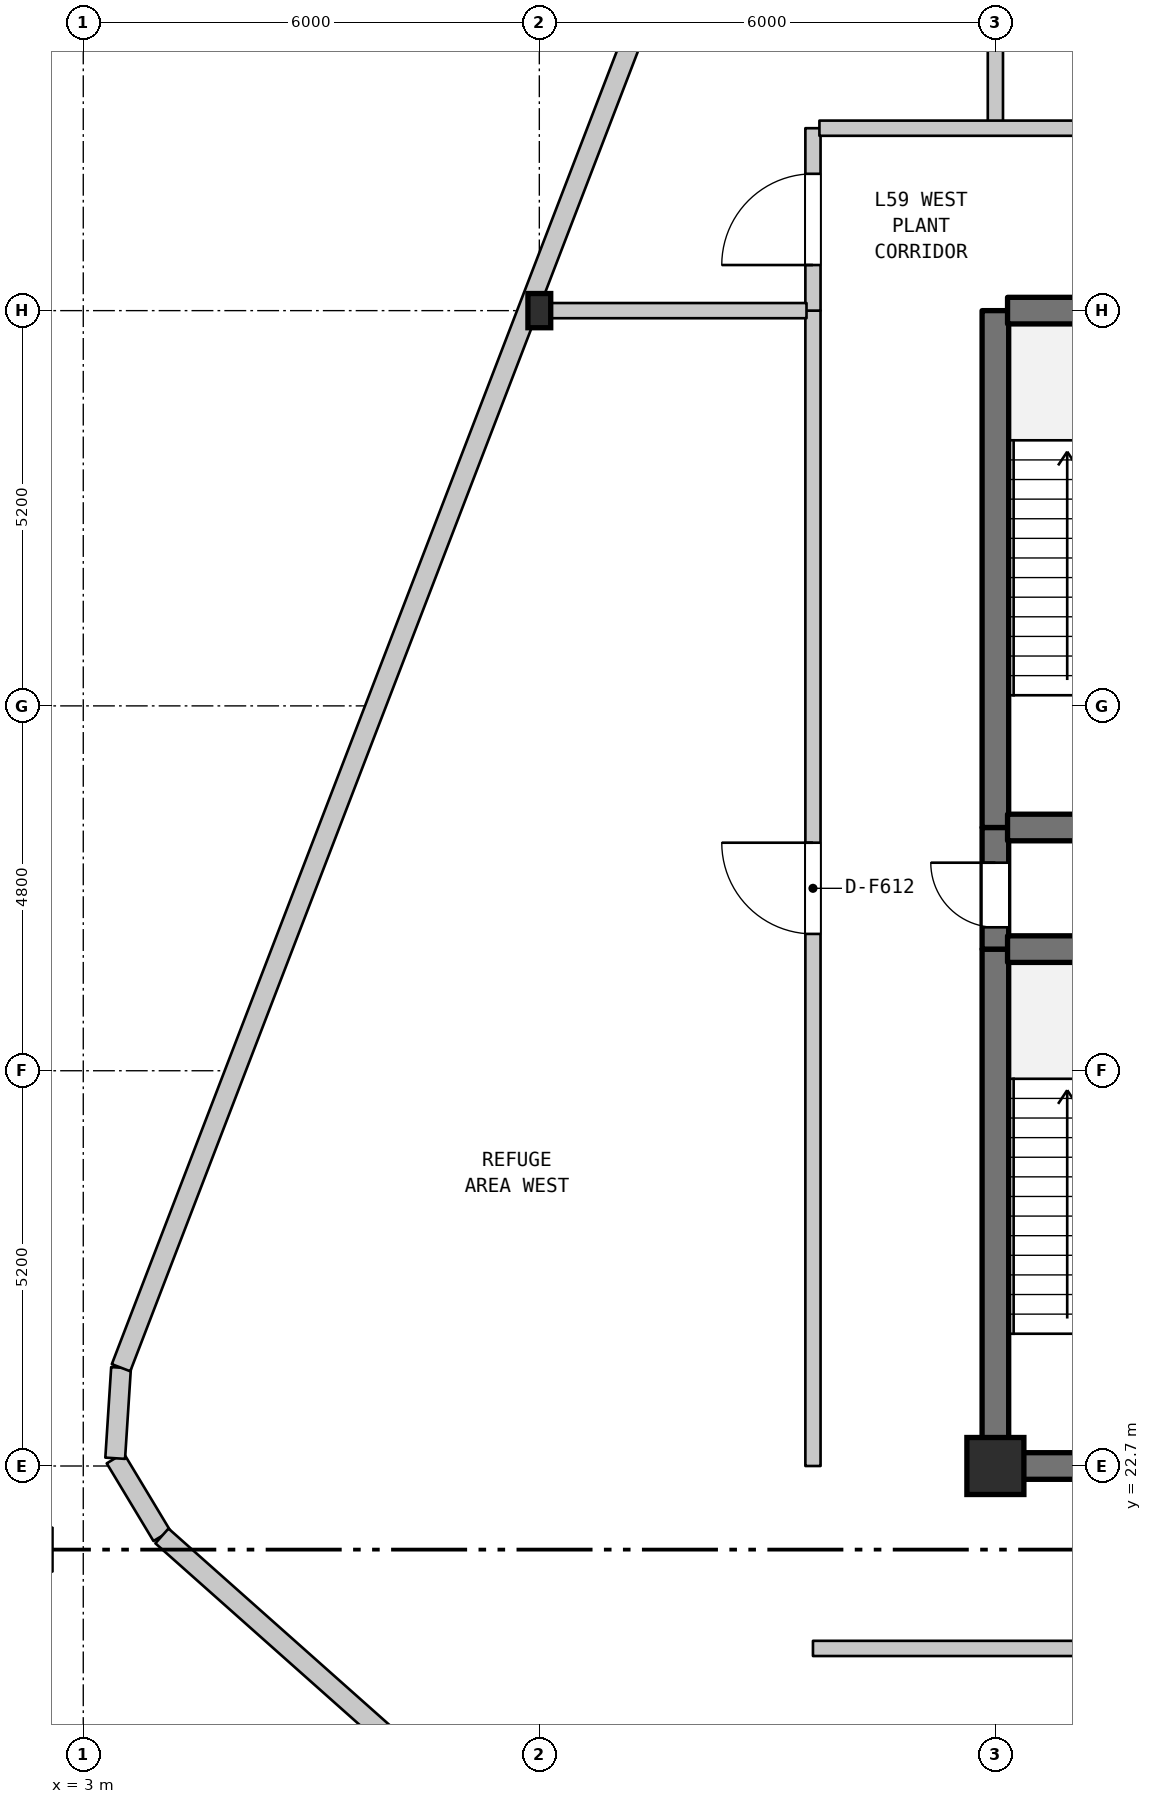
"""IFC4 building model, lengths in metres.
Left out: names, types, materials, properties, quantities, classifications, styles, units other than length and angle.
Written with IfcOpenShell. Run it as: python <this file> out.ifc"""

import sys

from ifc_helpers import new_model, si_unit, direction, frame, frame_2d, origin, origin_2d, place, context, subcontext, project, spatial, rectangle, i_section, extrude, element, fill, save


model = new_model("IFC4")
c1 = context("Model", 3, precision=1e-05, world=origin(), true_north=direction((0.0, 1.0)))
c2 = subcontext(c1, "Body", "Model", "MODEL_VIEW")
j1 = project(units=[si_unit("LENGTHUNIT", "METRE"), si_unit("PLANEANGLEUNIT", "RADIAN")], contexts=[c1])
p1 = place(None, origin())
s1 = spatial("IfcSite", under=j1, at=p1, CompositionType="ELEMENT")
p2 = place(p1, origin())
s2 = spatial("IfcBuilding", under=s1, at=p2, CompositionType="ELEMENT")
p3 = place(p2, frame((0.0, 0.0, 237.6)))
s3 = spatial("IfcBuildingStorey", under=s2, at=p3, CompositionType="ELEMENT", Elevation=237.6)
p4 = place(p3, frame((9.0, 37.9, 0.0), z_axis=(0.0, 0.0, 1.0), x_axis=(1.0, 0.0, 0.0)))
e1 = element("IfcColumn", 1, at=p4, inside=s3, PredefinedType="COLUMN", context=c2, shape_type="SweptSolid", body=[
    extrude(i_section(OverallWidth=0.3, OverallDepth=0.45, WebThickness=0.014, FlangeThickness=0.026, FilletRadius=0.027, at=origin_2d()), origin(), (0.0, 0.0, 1.0), 5.2),
])
p5 = place(p3, frame((15.0, 22.7, 0.0), z_axis=(0.0, 0.0, 1.0), x_axis=(1.0, 0.0, 0.0)))
e2 = element("IfcColumn", 2, at=p5, inside=s3, PredefinedType="COLUMN", context=c2, shape_type="SweptSolid", body=[
    extrude(rectangle(XDim=0.75, YDim=0.75, at=origin_2d()), origin(), (0.0, 0.0, 1.0), 5.2),
])
p6 = place(p3, frame((4.035, 21.78, 0.0), z_axis=(0.0, 0.0, 1.0), x_axis=(-0.51560906497, 0.856823956318, 0.0)))
e3 = element("IfcWall", 3, at=p6, inside=s3, PredefinedType="STANDARD", context=c2, shape_type="SweptSolid", body=[
    extrude(rectangle(XDim=1.193, YDim=0.26, at=frame_2d((0.596, 0.0))), origin(), (0.0, 0.0, 1.0), 4.88),
])
p7 = place(p3, frame((3.42, 22.802, 0.0), z_axis=(0.0, 0.0, 1.0), x_axis=(0.064645147091, 0.997908314906, 0.0)))
e4 = element("IfcWall", 4, at=p7, inside=s3, PredefinedType="STANDARD", context=c2, shape_type="SweptSolid", body=[
    extrude(rectangle(XDim=1.193, YDim=0.26, at=frame_2d((0.597, 0.0))), origin(), (0.0, 0.0, 1.0), 4.88),
])
p8 = place(p3, frame((3.497, 23.993, 0.0), z_axis=(0.0, 0.0, 1.0), x_axis=(0.358990281293, 0.93334129767, 0.0)))
e5 = element("IfcWall", 5, at=p8, inside=s3, PredefinedType="STANDARD", context=c2, shape_type="SweptSolid", body=[
    extrude(rectangle(XDim=30.669, YDim=0.26, at=frame_2d((15.335, 0.0))), origin(), (0.0, 0.0, 1.0), 4.88),
])
p9 = place(p3, frame((12.6, 22.7, 0.0), z_axis=(0.0, 0.0, 1.0), x_axis=(0.0, 1.0, 0.0)))
e6 = element("IfcWall", 6, at=p9, inside=s3, PredefinedType="STANDARD", context=c2, shape_type="SweptSolid", body=[
    extrude(rectangle(XDim=15.2, YDim=0.2, at=frame_2d((7.6, 0.0))), origin(), (0.0, 0.0, 1.0), 4.88),
])
p10 = place(p9, frame((7.0, 0.0, 0.0)))
e7 = element("IfcOpeningElement", 7, at=p10, cuts=e6, PredefinedType="OPENING", context=c2, shape_type="SweptSolid", body=[
    extrude(rectangle(XDim=1.2, YDim=2.2, at=frame_2d((0.6, 1.1))), frame((0.0, 0.11, 0.0), z_axis=(0.0, -1.0, 0.0), x_axis=(1.0, 0.0, 0.0)), (0.0, 0.0, 1.0), 0.22),
])
p11 = place(p3, frame((12.6, 37.9, 0.0), z_axis=(0.0, 0.0, 1.0), x_axis=(0.0, 1.0, 0.0)))
e8 = element("IfcWall", 8, at=p11, inside=s3, PredefinedType="STANDARD", context=c2, shape_type="SweptSolid", body=[
    extrude(rectangle(XDim=2.4, YDim=0.2, at=frame_2d((1.2, 0.0))), origin(), (0.0, 0.0, 1.0), 4.88),
])
p12 = place(p11, frame((0.6, 0.0, 0.0)))
e9 = element("IfcOpeningElement", 9, at=p12, cuts=e8, PredefinedType="OPENING", context=c2, shape_type="SweptSolid", body=[
    extrude(rectangle(XDim=1.2, YDim=2.2, at=frame_2d((0.6, 1.1))), frame((0.0, 0.11, 0.0), z_axis=(0.0, -1.0, 0.0), x_axis=(1.0, 0.0, 0.0)), (0.0, 0.0, 1.0), 0.22),
])
p13 = place(p3, frame((15.0, 22.7, 0.0), z_axis=(0.0, 0.0, 1.0), x_axis=(0.0, 1.0, 0.0)))
e10 = element("IfcWall", 10, at=p13, inside=s3, PredefinedType="SHEAR", context=c2, shape_type="SweptSolid", body=[
    extrude(rectangle(XDim=6.8, YDim=0.35, at=frame_2d((3.4, 0.0))), origin(), (0.0, 0.0, 1.0), 4.88),
])
p14 = place(p3, frame((15.0, 29.5, 0.0), z_axis=(0.0, 0.0, 1.0), x_axis=(0.0, 1.0, 0.0)))
e11 = element("IfcWall", 11, at=p14, inside=s3, PredefinedType="SHEAR", context=c2, shape_type="SweptSolid", body=[
    extrude(rectangle(XDim=1.6, YDim=0.35, at=frame_2d((0.8, 0.0))), origin(), (0.0, 0.0, 1.0), 4.88),
])
p15 = place(p14, frame((0.287, 0.0, 0.0)))
e12 = element("IfcOpeningElement", 12, at=p15, cuts=e11, PredefinedType="OPENING", context=c2, shape_type="SweptSolid", body=[
    extrude(rectangle(XDim=0.85, YDim=2.1, at=frame_2d((0.425, 1.05))), frame((0.0, 0.185, 0.0), z_axis=(0.0, -1.0, 0.0), x_axis=(1.0, 0.0, 0.0)), (0.0, 0.0, 1.0), 0.37),
])
p16 = place(p3, frame((15.0, 31.1, 0.0), z_axis=(0.0, 0.0, 1.0), x_axis=(0.0, 1.0, 0.0)))
e13 = element("IfcWall", 13, at=p16, inside=s3, PredefinedType="SHEAR", context=c2, shape_type="SweptSolid", body=[
    extrude(rectangle(XDim=6.8, YDim=0.35, at=frame_2d((3.4, 0.0))), origin(), (0.0, 0.0, 1.0), 4.88),
])
p17 = place(p3, frame((15.0, 40.3, 0.0), z_axis=(0.0, 0.0, 1.0), x_axis=(0.0, 1.0, 0.0)))
e14 = element("IfcWall", 14, at=p17, inside=s3, PredefinedType="STANDARD", context=c2, shape_type="SweptSolid", body=[
    extrude(rectangle(XDim=12.933, YDim=0.2, at=frame_2d((6.466, 0.0))), origin(), (0.0, 0.0, 1.0), 4.88),
])
p18 = place(p3, frame((12.6, 20.3, 0.0), z_axis=(0.0, 0.0, 1.0), x_axis=(1.0, 0.0, 0.0)))
e15 = element("IfcWall", 15, at=p18, inside=s3, PredefinedType="STANDARD", context=c2, shape_type="SweptSolid", body=[
    extrude(rectangle(XDim=20.315, YDim=0.2, at=frame_2d((10.157, 0.0))), origin(), (0.0, 0.0, 1.0), 4.88),
])
p19 = place(p18, frame((6.8, 0.0, 0.0)))
e16 = element("IfcOpeningElement", 16, at=p19, cuts=e15, PredefinedType="OPENING", context=c2, shape_type="SweptSolid", body=[
    extrude(rectangle(XDim=1.2, YDim=2.2, at=frame_2d((0.6, 1.1))), frame((0.0, 0.11, 0.0), z_axis=(0.0, -1.0, 0.0), x_axis=(1.0, 0.0, 0.0)), (0.0, 0.0, 1.0), 0.22),
])
p20 = place(p18, frame((16.225, 0.0, 0.0)))
e17 = element("IfcOpeningElement", 17, at=p20, cuts=e15, PredefinedType="OPENING", context=c2, shape_type="SweptSolid", body=[
    extrude(rectangle(XDim=1.2, YDim=2.2, at=frame_2d((0.6, 1.1))), frame((0.0, 0.11, 0.0), z_axis=(0.0, -1.0, 0.0), x_axis=(1.0, 0.0, 0.0)), (0.0, 0.0, 1.0), 0.22),
])
for number, where, z_axis, x_axis in (
    (18, (15.16, 22.7, 0.0), (0.0, 0.0, 1.0), (1.0, 0.0, 0.0)),
    (19, (15.16, 29.5, 0.0), (0.0, 0.0, 1.0), (1.0, 0.0, 0.0)),
    (20, (15.16, 31.1, 0.0), (0.0, 0.0, 1.0), (1.0, 0.0, 0.0)),
):
    element("IfcWall", number, at=place(p3, frame(where, z_axis=z_axis, x_axis=x_axis)), inside=s3, PredefinedType="SHEAR", context=c2, shape_type="SweptSolid", body=[
        extrude(rectangle(XDim=3.68, YDim=0.35, at=frame_2d((1.84, 0.0))), origin(), (0.0, 0.0, 1.0), 4.88),
    ])
p21 = place(p3, frame((8.856, 37.9, 0.0), z_axis=(0.0, 0.0, 1.0), x_axis=(1.0, 0.0, 0.0)))
e21 = element("IfcWall", 21, at=p21, inside=s3, PredefinedType="STANDARD", context=c2, shape_type="SweptSolid", body=[
    extrude(rectangle(XDim=3.659, YDim=0.2, at=frame_2d((1.83, 0.0))), origin(), (0.0, 0.0, 1.0), 4.88),
])
p22 = place(p3, frame((15.16, 37.9, 0.0), z_axis=(0.0, 0.0, 1.0), x_axis=(1.0, 0.0, 0.0)))
e22 = element("IfcWall", 22, at=p22, inside=s3, PredefinedType="SHEAR", context=c2, shape_type="SweptSolid", body=[
    extrude(rectangle(XDim=3.68, YDim=0.35, at=frame_2d((1.84, 0.0))), origin(), (0.0, 0.0, 1.0), 4.88),
])
p23 = place(p3, frame((12.685, 40.3, 0.0), z_axis=(0.0, 0.0, 1.0), x_axis=(1.0, 0.0, 0.0)))
e23 = element("IfcWall", 23, at=p23, inside=s3, PredefinedType="STANDARD", context=c2, shape_type="SweptSolid", body=[
    extrude(rectangle(XDim=20.23, YDim=0.2, at=frame_2d((10.115, 0.0))), origin(), (0.0, 0.0, 1.0), 4.88),
])
p24 = place(p23, frame((12.14, 0.0, 0.0)))
e24 = element("IfcOpeningElement", 24, at=p24, cuts=e23, PredefinedType="OPENING", context=c2, shape_type="SweptSolid", body=[
    extrude(rectangle(XDim=1.2, YDim=2.2, at=frame_2d((0.6, 1.1))), frame((0.0, 0.11, 0.0), z_axis=(0.0, -1.0, 0.0), x_axis=(1.0, 0.0, 0.0)), (0.0, 0.0, 1.0), 0.22),
])
p25 = place(p3, frame((17.439, 9.865, 0.0), z_axis=(0.0, 0.0, 1.0), x_axis=(-0.747407065455, 0.664366373703, 0.0)))
e25 = element("IfcWall", 25, at=p25, inside=s3, PredefinedType="STANDARD", context=c2, shape_type="SweptSolid", body=[
    extrude(rectangle(XDim=17.934, YDim=0.26, at=frame_2d((8.967, 0.0))), origin(), (0.0, 0.0, 1.0), 4.88),
])
p26 = place(p10, origin())
e26 = element("IfcDoor", 26, at=p26, inside=s3, OperationType="SINGLE_SWING_RIGHT", PredefinedType="DOOR", context=c2, shape_type="SweptSolid", body=[
    extrude(rectangle(XDim=1.2, YDim=2.2, at=frame_2d((0.6, 1.1))), frame((0.0, 0.025, 0.0), z_axis=(0.0, -1.0, 0.0), x_axis=(1.0, 0.0, 0.0)), (0.0, 0.0, 1.0), 0.05),
])
fill(e7, e26)
p27 = place(p12, origin())
e27 = element("IfcDoor", 27, at=p27, inside=s3, OperationType="SINGLE_SWING_LEFT", PredefinedType="DOOR", context=c2, shape_type="SweptSolid", body=[
    extrude(rectangle(XDim=1.2, YDim=2.2, at=frame_2d((0.6, 1.1))), frame((0.0, 0.025, 0.0), z_axis=(0.0, -1.0, 0.0), x_axis=(1.0, 0.0, 0.0)), (0.0, 0.0, 1.0), 0.05),
])
fill(e9, e27)
p28 = place(p15, origin())
e28 = element("IfcDoor", 28, at=p28, inside=s3, OperationType="SINGLE_SWING_RIGHT", PredefinedType="DOOR", context=c2, shape_type="SweptSolid", body=[
    extrude(rectangle(XDim=0.85, YDim=2.1, at=frame_2d((0.425, 1.05))), frame((0.0, 0.025, 0.0), z_axis=(0.0, -1.0, 0.0), x_axis=(1.0, 0.0, 0.0)), (0.0, 0.0, 1.0), 0.05),
])
fill(e12, e28)
save(model, sys.argv[1])
